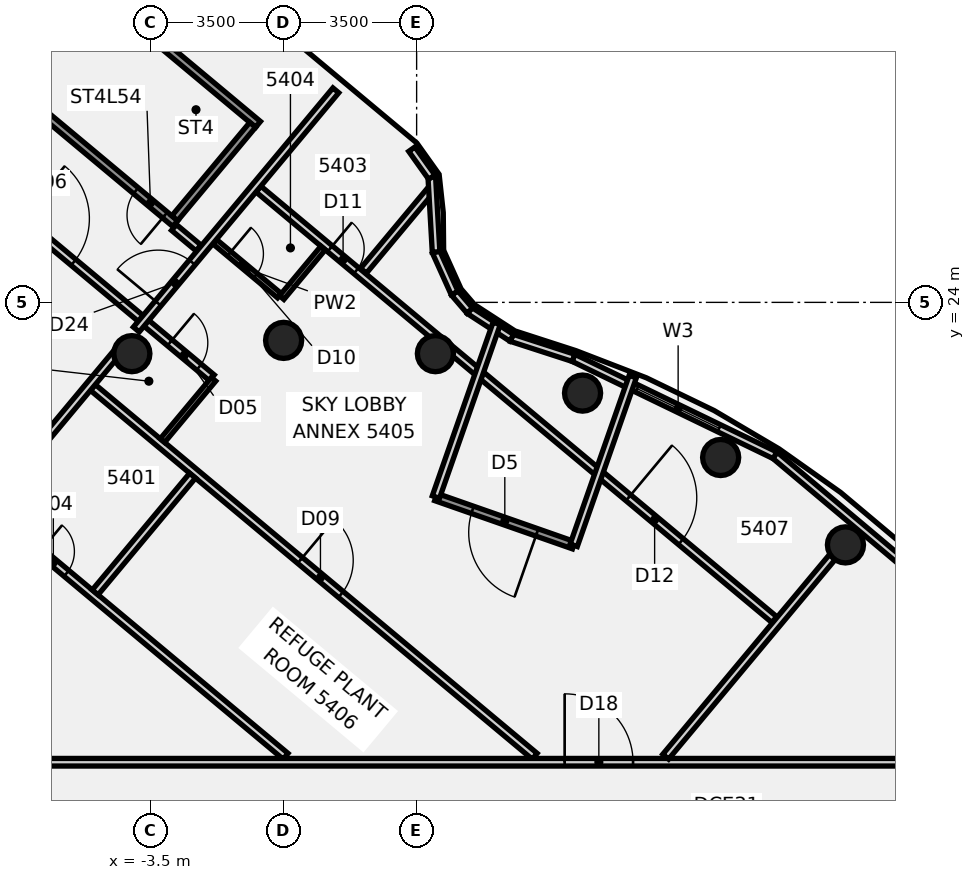
"""IFC4 building model, lengths in metres.
Left out: names, types, materials, properties, quantities, classifications, styles, units other than length and angle.
Written with IfcOpenShell. Run it as: python <this file> out.ifc"""

import sys

from ifc_helpers import new_model, si_unit, direction, frame, frame_2d, origin, origin_2d, place, context, subcontext, project, spatial, polyline, rectangle, circle, outline, extrude, element, fill, save


model = new_model("IFC4")
c1 = context("Model", 3, precision=1e-05, world=origin(), true_north=direction((0.0, 1.0)))
c2 = subcontext(c1, "Body", "Model", "MODEL_VIEW")
j1 = project(units=[si_unit("LENGTHUNIT", "METRE"), si_unit("PLANEANGLEUNIT", "RADIAN")], contexts=[c1])
p1 = place(None, origin())
s1 = spatial("IfcSite", under=j1, at=p1, CompositionType="ELEMENT")
p2 = place(p1, origin())
s2 = spatial("IfcBuilding", under=s1, at=p2, CompositionType="ELEMENT")
p3 = place(p2, frame((0.0, 0.0, 214.9)))
s3 = spatial("IfcBuildingStorey", under=s2, at=p3, CompositionType="ELEMENT", Elevation=214.9)
for number, where, z_axis, x_axis in (
    (1, (14.784, 17.619, -0.18), (0.0, 0.0, 1.0), (1.0, 0.0, 0.0)),
    (2, (11.5, 19.919, -0.18), (0.0, 0.0, 1.0), (1.0, 0.0, 0.0)),
    (3, (7.866, 21.613, -0.18), (0.0, 0.0, 1.0), (1.0, 0.0, 0.0)),
    (4, (3.994, 22.651, -0.18), (0.0, 0.0, 1.0), (1.0, 0.0, 0.0)),
    (5, (0.0, 23.0, -0.18), (0.0, 0.0, 1.0), (1.0, 0.0, 0.0)),
    (6, (-3.994, 22.651, -0.18), (0.0, 0.0, 1.0), (1.0, 0.0, 0.0)),
):
    element("IfcColumn", number, at=place(p3, frame(where, z_axis=z_axis, x_axis=x_axis)), inside=s3, PredefinedType="COLUMN", context=c2, shape_type="SweptSolid", body=[
        extrude(circle(Radius=0.475, at=origin_2d()), origin(), (0.0, 0.0, 1.0), 5.04),
    ])
p4 = place(p3, frame((-12.256, 22.329, 0.0), z_axis=(0.0, 0.0, 1.0), x_axis=(0.767726730688, -0.640777392693, 0.0)))
e7 = element("IfcWall", 7, at=p4, inside=s3, PredefinedType="PARTITIONING", context=c2, shape_type="SweptSolid", body=[
    extrude(rectangle(XDim=16.031, YDim=0.2, at=frame_2d((8.016, 0.0))), origin(), (0.0, 0.0, 1.0), 4.16),
])
p5 = place(p4, frame((7.62, 0.0, 0.0)))
e8 = element("IfcOpeningElement", 8, at=p5, cuts=e7, PredefinedType="OPENING", context=c2, shape_type="SweptSolid", body=[
    extrude(rectangle(XDim=0.9, YDim=2.1, at=frame_2d((0.45, 1.05))), frame((0.0, 0.11, 0.0), z_axis=(0.0, -1.0, 0.0), x_axis=(1.0, 0.0, 0.0)), (0.0, 0.0, 1.0), 0.22),
])
p6 = place(p3, frame((-10.519, 29.217, 0.0), z_axis=(0.0, 0.0, 1.0), x_axis=(0.767759961509, -0.640737576161, 0.0)))
e9 = element("IfcWall", 9, at=p6, inside=s3, PredefinedType="PARTITIONING", context=c2, shape_type="SweptSolid", body=[
    extrude(rectangle(XDim=11.24, YDim=0.2, at=frame_2d((5.62, 0.0))), origin(), (0.0, 0.0, 1.0), 4.16),
])
p7 = place(p6, frame((9.8, 0.0, 0.0)))
e10 = element("IfcOpeningElement", 10, at=p7, cuts=e9, PredefinedType="OPENING", context=c2, shape_type="SweptSolid", body=[
    extrude(rectangle(XDim=1.0, YDim=2.1, at=frame_2d((0.5, 1.05))), frame((0.0, 0.11, 0.0), z_axis=(0.0, -1.0, 0.0), x_axis=(1.0, 0.0, 0.0)), (0.0, 0.0, 1.0), 0.22),
])
p8 = place(p6, frame((4.7, 0.0, 0.0)))
e11 = element("IfcOpeningElement", 11, at=p8, cuts=e9, PredefinedType="OPENING", context=c2, shape_type="SweptSolid", body=[
    extrude(rectangle(XDim=1.8, YDim=2.1, at=frame_2d((0.9, 1.05))), frame((0.0, 0.11, 0.0), z_axis=(0.0, -1.0, 0.0), x_axis=(1.0, 0.0, 0.0)), (0.0, 0.0, 1.0), 0.22),
])
p9 = place(p3, frame((-2.885, 25.971, 0.0), z_axis=(0.0, 0.0, 1.0), x_axis=(0.767840279937, -0.640641322822, 0.0)))
e12 = element("IfcWall", 12, at=p9, inside=s3, PredefinedType="PARTITIONING", context=c2, shape_type="SweptSolid", body=[
    extrude(rectangle(XDim=0.841, YDim=0.2, at=frame_2d((0.42, 0.0))), origin(), (0.0, 0.0, 1.0), 4.16),
])
p10 = place(p3, frame((-5.019, 21.761, 0.0), z_axis=(0.0, 0.0, 1.0), x_axis=(0.767714934774, -0.640791525323, 0.0)))
e13 = element("IfcWall", 13, at=p10, inside=s3, PredefinedType="PARTITIONING", context=c2, shape_type="SweptSolid", body=[
    extrude(rectangle(XDim=15.144, YDim=0.2, at=frame_2d((7.572, 0.0))), origin(), (0.0, 0.0, 1.0), 4.16),
])
p11 = place(p10, frame((7.1, 0.0, 0.0)))
e14 = element("IfcOpeningElement", 14, at=p11, cuts=e13, PredefinedType="OPENING", context=c2, shape_type="SweptSolid", body=[
    extrude(rectangle(XDim=1.4, YDim=2.1, at=frame_2d((0.7, 1.05))), frame((0.0, 0.11, 0.0), z_axis=(0.0, -1.0, 0.0), x_axis=(1.0, 0.0, 0.0)), (0.0, 0.0, 1.0), 0.22),
])
p12 = place(p3, frame((-1.815, 25.599, 0.0), z_axis=(0.0, 0.0, 1.0), x_axis=(0.767616896799, -0.640908963698, 0.0)))
e15 = element("IfcWall", 15, at=p12, inside=s3, PredefinedType="PARTITIONING", context=c2, shape_type="SweptSolid", body=[
    extrude(rectangle(XDim=2.22, YDim=0.15, at=frame_2d((1.11, 0.0))), origin(), (0.0, 0.0, 1.0), 4.16),
])
p13 = place(p12, frame((0.5, 0.0, 0.0)))
e16 = element("IfcOpeningElement", 16, at=p13, cuts=e15, PredefinedType="OPENING", context=c2, shape_type="SweptSolid", body=[
    extrude(rectangle(XDim=0.9, YDim=2.1, at=frame_2d((0.45, 1.05))), frame((0.0, 0.085, 0.0), z_axis=(0.0, -1.0, 0.0), x_axis=(1.0, 0.0, 0.0)), (0.0, 0.0, 1.0), 0.17),
])
p14 = place(p3, frame((-0.662, 26.981, 0.0), z_axis=(0.0, 0.0, 1.0), x_axis=(0.767770033975, -0.640725506695, 0.0)))
e17 = element("IfcWall", 17, at=p14, inside=s3, PredefinedType="PARTITIONING", context=c2, shape_type="SweptSolid", body=[
    extrude(rectangle(XDim=6.123, YDim=0.2, at=frame_2d((3.061, 0.0))), origin(), (0.0, 0.0, 1.0), 4.16),
])
p15 = place(p14, frame((2.45, 0.0, 0.0)))
e18 = element("IfcOpeningElement", 18, at=p15, cuts=e17, PredefinedType="OPENING", context=c2, shape_type="SweptSolid", body=[
    extrude(rectangle(XDim=0.9, YDim=2.1, at=frame_2d((0.45, 1.05))), frame((0.0, 0.11, 0.0), z_axis=(0.0, -1.0, 0.0), x_axis=(1.0, 0.0, 0.0)), (0.0, 0.0, 1.0), 0.22),
])
p16 = place(p3, frame((4.384, 22.77, 0.0), z_axis=(0.0, 0.0, 1.0), x_axis=(0.767777908079, -0.640716071178, 0.0)))
e19 = element("IfcWall", 19, at=p16, inside=s3, PredefinedType="PARTITIONING", context=c2, shape_type="SweptSolid", body=[
    extrude(rectangle(XDim=11.108, YDim=0.2, at=frame_2d((5.554, 0.0))), origin(), (0.0, 0.0, 1.0), 4.16),
])
p17 = place(p16, frame((6.106, 0.0, 0.0)))
e20 = element("IfcOpeningElement", 20, at=p17, cuts=e19, PredefinedType="OPENING", context=c2, shape_type="SweptSolid", body=[
    extrude(rectangle(XDim=1.8, YDim=2.1, at=frame_2d((0.9, 1.05))), frame((0.0, 0.11, 0.0), z_axis=(0.0, -1.0, 0.0), x_axis=(1.0, 0.0, 0.0)), (0.0, 0.0, 1.0), 0.22),
])
p18 = place(p3, frame((-17.045, 11.9, 0.0), z_axis=(0.0, 0.0, 1.0), x_axis=(1.0, 0.0, 0.0)))
e21 = element("IfcWall", 21, at=p18, inside=s3, PredefinedType="PARTITIONING", context=c2, shape_type="SweptSolid", body=[
    extrude(rectangle(XDim=34.145, YDim=0.2, at=frame_2d((17.073, 0.0))), origin(), (0.0, 0.0, 1.0), 4.16),
])
p19 = place(p18, frame((24.44, 0.0, 0.0)))
e22 = element("IfcOpeningElement", 22, at=p19, cuts=e21, PredefinedType="OPENING", context=c2, shape_type="SweptSolid", body=[
    extrude(rectangle(XDim=1.8, YDim=2.1, at=frame_2d((0.9, 1.05))), frame((0.0, 0.11, 0.0), z_axis=(0.0, -1.0, 0.0), x_axis=(1.0, 0.0, 0.0)), (0.0, 0.0, 1.0), 0.22),
])
p20 = place(p18, frame((9.086, 0.0, 0.0)))
e23 = element("IfcOpeningElement", 23, at=p20, cuts=e21, PredefinedType="OPENING", context=c2, shape_type="SweptSolid", body=[
    extrude(rectangle(XDim=1.8, YDim=2.1, at=frame_2d((0.9, 1.05))), frame((0.0, 0.11, 0.0), z_axis=(0.0, -1.0, 0.0), x_axis=(1.0, 0.0, 0.0)), (0.0, 0.0, 1.0), 0.22),
])
p21 = place(p3, frame((-14.145, 25.028, 0.0), z_axis=(0.0, 0.0, 1.0), x_axis=(0.640714977606, 0.767778820671, 0.0)))
e24 = element("IfcWall", 24, at=p21, inside=s3, PredefinedType="PARTITIONING", context=c2, shape_type="SweptSolid", body=[
    extrude(rectangle(XDim=13.438, YDim=0.2, at=frame_2d((6.719, 0.0))), origin(), (0.0, 0.0, 1.0), 4.16),
])
p22 = place(p21, frame((5.84, 0.0, 0.0)))
e25 = element("IfcOpeningElement", 25, at=p22, cuts=e24, PredefinedType="OPENING", context=c2, shape_type="SweptSolid", body=[
    extrude(rectangle(XDim=1.8, YDim=2.1, at=frame_2d((0.9, 1.05))), frame((0.0, 0.11, 0.0), z_axis=(0.0, -1.0, 0.0), x_axis=(1.0, 0.0, 0.0)), (0.0, 0.0, 1.0), 0.22),
])
p23 = place(p3, frame((-7.723, 18.677, 0.0), z_axis=(0.0, 0.0, 1.0), x_axis=(0.640682845605, 0.767805633834, 0.0)))
e26 = element("IfcWall", 26, at=p23, inside=s3, PredefinedType="PARTITIONING", context=c2, shape_type="SweptSolid", body=[
    extrude(rectangle(XDim=5.491, YDim=0.2, at=frame_2d((2.745, 0.0))), origin(), (0.0, 0.0, 1.0), 4.16),
])
p24 = place(p3, frame((-3.877, 23.286, 0.0), z_axis=(0.0, 0.0, 1.0), x_axis=(0.640673591949, 0.767813355302, 0.0)))
e27 = element("IfcWall", 27, at=p24, inside=s3, PredefinedType="PARTITIONING", context=c2, shape_type="SweptSolid", body=[
    extrude(rectangle(XDim=8.196, YDim=0.2, at=frame_2d((4.098, 0.0))), origin(), (0.0, 0.0, 1.0), 4.16),
])
p25 = place(p24, frame((0.897, 0.0, 0.0)))
e28 = element("IfcOpeningElement", 28, at=p25, cuts=e27, PredefinedType="OPENING", context=c2, shape_type="SweptSolid", body=[
    extrude(rectangle(XDim=1.4, YDim=2.1, at=frame_2d((0.7, 1.05))), frame((0.0, 0.11, 0.0), z_axis=(0.0, -1.0, 0.0), x_axis=(1.0, 0.0, 0.0)), (0.0, 0.0, 1.0), 0.22),
])
p26 = place(p3, frame((-4.959, 16.37, 0.0), z_axis=(0.0, 0.0, 1.0), x_axis=(0.64071252412, 0.76778086811, 0.0)))
e29 = element("IfcWall", 29, at=p26, inside=s3, PredefinedType="PARTITIONING", context=c2, shape_type="SweptSolid", body=[
    extrude(rectangle(XDim=4.0, YDim=0.2, at=frame_2d((2.0, 0.0))), origin(), (0.0, 0.0, 1.0), 4.16),
])
p27 = place(p3, frame((2.101, 24.831, 0.0), z_axis=(0.0, 0.0, 1.0), x_axis=(0.640706543974, 0.767785858497, 0.0)))
e30 = element("IfcWall", 30, at=p27, inside=s3, PredefinedType="PARTITIONING", context=c2, shape_type="SweptSolid", body=[
    extrude(rectangle(XDim=2.713, YDim=0.2, at=frame_2d((1.356, 0.0))), origin(), (0.0, 0.0, 1.0), 4.16),
])
p28 = place(p3, frame((-3.189, 20.364, 0.0), z_axis=(0.0, 0.0, 1.0), x_axis=(0.640573180371, 0.767897128911, 0.0)))
e31 = element("IfcWall", 31, at=p28, inside=s3, PredefinedType="PARTITIONING", context=c2, shape_type="SweptSolid", body=[
    extrude(rectangle(XDim=2.1, YDim=0.15, at=frame_2d((1.05, 0.0))), origin(), (0.0, 0.0, 1.0), 4.16),
])
p29 = place(p3, frame((-0.051, 24.125, 0.0), z_axis=(0.0, 0.0, 1.0), x_axis=(0.640565579042, 0.76790346981, 0.0)))
e32 = element("IfcWall", 32, at=p29, inside=s3, PredefinedType="PARTITIONING", context=c2, shape_type="SweptSolid", body=[
    extrude(rectangle(XDim=1.701, YDim=0.15, at=frame_2d((0.85, 0.0))), origin(), (0.0, 0.0, 1.0), 4.16),
])
p30 = place(p3, frame((10.054, 12.046, 0.0), z_axis=(0.0, 0.0, 1.0), x_axis=(0.640840216636, 0.767674290792, 0.0)))
e33 = element("IfcWall", 33, at=p30, inside=s3, PredefinedType="PARTITIONING", context=c2, shape_type="SweptSolid", body=[
    extrude(rectangle(XDim=6.845, YDim=0.2, at=frame_2d((3.422, 0.0))), origin(), (0.0, 0.0, 1.0), 4.16),
])
p31 = place(p3, frame((17.438, 16.192, 0.0), z_axis=(0.0, 0.0, 1.0), x_axis=(-0.765856810589, 0.643011155171, 0.0)))
e34 = element("IfcWall", 34, at=p31, inside=s3, PredefinedType="SOLIDWALL", context=c2, shape_type="SweptSolid", body=[
    extrude(rectangle(XDim=5.887, YDim=0.2, at=frame_2d((2.943, 0.0))), origin(), (0.0, 0.0, 1.0), 4.86),
])
p32 = place(p3, frame((12.929, 19.977, 0.0), z_axis=(0.0, 0.0, 1.0), x_axis=(-0.900284518019, 0.435301948785, 0.0)))
e35 = element("IfcWall", 35, at=p32, inside=s3, PredefinedType="SOLIDWALL", context=c2, shape_type="SweptSolid", body=[
    extrude(rectangle(XDim=5.889, YDim=0.2, at=frame_2d((2.945, 0.0))), origin(), (0.0, 0.0, 1.0), 4.86),
])
p33 = place(p32, frame((1.63, 0.0, 1.4)))
e36 = element("IfcOpeningElement", 36, at=p33, cuts=e35, PredefinedType="OPENING", context=c2, shape_type="SweptSolid", body=[
    extrude(rectangle(XDim=2.4, YDim=2.1, at=frame_2d((1.2, 1.05))), frame((0.0, 0.11, 0.0), z_axis=(0.0, -1.0, 0.0), x_axis=(1.0, 0.0, 0.0)), (0.0, 0.0, 1.0), 0.22),
])
p34 = place(p3, frame((7.627, 22.541, 0.0), z_axis=(0.0, 0.0, 1.0), x_axis=(-0.95133493258, 0.308158800056, 0.0)))
e37 = element("IfcWall", 37, at=p34, inside=s3, PredefinedType="SOLIDWALL", context=c2, shape_type="SweptSolid", body=[
    extrude(rectangle(XDim=1.709, YDim=0.2, at=frame_2d((0.854, 0.0))), origin(), (0.0, 0.0, 1.0), 4.86),
])
p35 = place(p3, frame((6.001, 23.067, 0.0), z_axis=(0.0, 0.0, 1.0), x_axis=(-0.839116919662, 0.543951096274, 0.0)))
e38 = element("IfcWall", 38, at=p35, inside=s3, PredefinedType="SOLIDWALL", context=c2, shape_type="SweptSolid", body=[
    extrude(rectangle(XDim=1.316, YDim=0.2, at=frame_2d((0.658, 0.0))), origin(), (0.0, 0.0, 1.0), 4.86),
])
p36 = place(p3, frame((4.897, 23.783, 0.0), z_axis=(0.0, 0.0, 1.0), x_axis=(-0.651417628254, 0.758719364192, 0.0)))
e39 = element("IfcWall", 39, at=p36, inside=s3, PredefinedType="SOLIDWALL", context=c2, shape_type="SweptSolid", body=[
    extrude(rectangle(XDim=0.61, YDim=0.2, at=frame_2d((0.305, 0.0))), origin(), (0.0, 0.0, 1.0), 4.86),
])
p37 = place(p3, frame((4.5, 24.246, 0.0), z_axis=(0.0, 0.0, 1.0), x_axis=(-0.411322207494, 0.911490011806, 0.0)))
e40 = element("IfcWall", 40, at=p37, inside=s3, PredefinedType="SOLIDWALL", context=c2, shape_type="SweptSolid", body=[
    extrude(rectangle(XDim=1.187, YDim=0.2, at=frame_2d((0.594, 0.0))), origin(), (0.0, 0.0, 1.0), 4.86),
])
p38 = place(p3, frame((4.011, 25.328, 0.0), z_axis=(0.0, 0.0, 1.0), x_axis=(-0.057109766027, 0.998367905446, 0.0)))
e41 = element("IfcWall", 41, at=p38, inside=s3, PredefinedType="SOLIDWALL", context=c2, shape_type="SweptSolid", body=[
    extrude(rectangle(XDim=1.971, YDim=0.2, at=frame_2d((0.985, 0.0))), origin(), (0.0, 0.0, 1.0), 4.86),
])
p39 = place(p3, frame((3.899, 27.295, 0.0), z_axis=(0.0, 0.0, 1.0), x_axis=(-0.580599391883, 0.814189379779, 0.0)))
e42 = element("IfcWall", 42, at=p39, inside=s3, PredefinedType="SOLIDWALL", context=c2, shape_type="SweptSolid", body=[
    extrude(rectangle(XDim=0.904, YDim=0.2, at=frame_2d((0.452, 0.0))), origin(), (0.0, 0.0, 1.0), 4.86),
])
p40 = place(p3, frame((7.634, 17.608, 0.0), z_axis=(0.0, 0.0, 1.0), x_axis=(-0.943849439762, 0.330375899638, 0.0)))
e43 = element("IfcWall", 43, at=p40, inside=s3, PredefinedType="SOLIDWALL", context=c2, shape_type="SweptSolid", body=[
    extrude(rectangle(XDim=3.842, YDim=0.2, at=frame_2d((1.921, 0.0))), origin(), (0.0, 0.0, 1.0), 4.364),
])
p41 = place(p40, frame((1.021, 0.0, 0.0)))
e44 = element("IfcOpeningElement", 44, at=p41, cuts=e43, PredefinedType="OPENING", context=c2, shape_type="SweptSolid", body=[
    extrude(rectangle(XDim=1.8, YDim=2.4, at=frame_2d((0.9, 1.2))), frame((0.0, 0.11, 0.0), z_axis=(0.0, -1.0, 0.0), x_axis=(1.0, 0.0, 0.0)), (0.0, 0.0, 1.0), 0.22),
])
p42 = place(p3, frame((7.634, 17.608, 0.0), z_axis=(0.0, 0.0, 1.0), x_axis=(0.330366613527, 0.943852690131, 0.0)))
e45 = element("IfcWall", 45, at=p42, inside=s3, PredefinedType="SOLIDWALL", context=c2, shape_type="SweptSolid", body=[
    extrude(rectangle(XDim=4.702, YDim=0.2, at=frame_2d((2.351, 0.0))), origin(), (0.0, 0.0, 1.0), 4.86),
])
p43 = place(p3, frame((4.007, 18.878, 0.0), z_axis=(0.0, 0.0, 1.0), x_axis=(0.330357165554, 0.94385599705, 0.0)))
e46 = element("IfcWall", 46, at=p43, inside=s3, PredefinedType="SOLIDWALL", context=c2, shape_type="SweptSolid", body=[
    extrude(rectangle(XDim=4.84, YDim=0.2, at=frame_2d((2.42, 0.0))), origin(), (0.0, 0.0, 1.0), 4.364),
])
p44 = place(p3, frame((-2.852, 26.074, -0.18), z_axis=(0.0, 0.0, 1.0), x_axis=(-0.767728232678, 0.640775593129, 0.0)))
e47 = element("IfcWall", 47, at=p44, inside=s3, PredefinedType="SHEAR", context=c2, shape_type="SweptSolid", body=[
    extrude(rectangle(XDim=6.7, YDim=0.2, at=frame_2d((3.35, 0.0))), origin(), (0.0, 0.0, 1.0), 4.444),
])
p45 = place(p44, frame((0.35, 0.0, 0.0)))
e48 = element("IfcOpeningElement", 48, at=p45, cuts=e47, PredefinedType="OPENING", context=c2, shape_type="SweptSolid", body=[
    extrude(rectangle(XDim=1.0, YDim=2.1, at=frame_2d((0.5, 1.05))), frame((0.0, 0.11, 0.0), z_axis=(0.0, -1.0, 0.0), x_axis=(1.0, 0.0, 0.0)), (0.0, 0.0, 1.0), 0.22),
])
p46 = place(p3, frame((-0.674, 28.684, -0.18), z_axis=(0.0, 0.0, 1.0), x_axis=(-0.767713270537, 0.640793519195, 0.0)))
e49 = element("IfcWall", 49, at=p46, inside=s3, PredefinedType="SHEAR", context=c2, shape_type="SweptSolid", body=[
    extrude(rectangle(XDim=6.7, YDim=0.2, at=frame_2d((3.35, 0.0))), origin(), (0.0, 0.0, 1.0), 4.444),
])
p47 = place(p3, frame((-0.814, 28.671, -0.18), z_axis=(0.0, 0.0, 1.0), x_axis=(-0.640777035898, -0.767727028485, 0.0)))
e50 = element("IfcWall", 50, at=p47, inside=s3, PredefinedType="SHEAR", context=c2, shape_type="SweptSolid", body=[
    extrude(rectangle(XDim=3.2, YDim=0.2, at=frame_2d((1.6, 0.0))), origin(), (0.0, 0.0, 1.0), 5.04),
])
p48 = place(p3, frame((0.0, 0.0, -0.18)))
e51 = element("IfcWall", 51, at=p48, inside=s3, PredefinedType="SHEAR", context=c2, shape_type="SweptSolid", body=[
    extrude(outline(polyline([(-5.728, 32.772), (-5.881, 32.9), (-7.932, 30.444), (-7.778, 30.316), (-5.728, 32.772)])), origin(), (0.0, 0.0, 1.0), 4.444),
])
p49 = place(p5, origin())
e52 = element("IfcDoor", 52, at=p49, inside=s3, OperationType="SINGLE_SWING_LEFT", PredefinedType="DOOR", context=c2, shape_type="SweptSolid", body=[
    extrude(rectangle(XDim=0.9, YDim=2.1, at=frame_2d((0.45, 1.05))), frame((0.0, 0.025, 0.0), z_axis=(0.0, -1.0, 0.0), x_axis=(1.0, 0.0, 0.0)), (0.0, 0.0, 1.0), 0.05),
])
fill(e8, e52)
p50 = place(p7, frame((1.0, 0.0, 0.0), z_axis=(0.0, 0.0, 1.0), x_axis=(-1.0, 0.0, 0.0)))
e53 = element("IfcDoor", 53, at=p50, inside=s3, OperationType="SINGLE_SWING_RIGHT", PredefinedType="DOOR", context=c2, shape_type="SweptSolid", body=[
    extrude(rectangle(XDim=1.0, YDim=2.1, at=frame_2d((0.5, 1.05))), frame((0.0, 0.025, 0.0), z_axis=(0.0, -1.0, 0.0), x_axis=(1.0, 0.0, 0.0)), (0.0, 0.0, 1.0), 0.05),
])
fill(e10, e53)
p51 = place(p8, frame((1.8, 0.0, 0.0), z_axis=(0.0, 0.0, 1.0), x_axis=(-1.0, 0.0, 0.0)))
e54 = element("IfcDoor", 54, at=p51, inside=s3, OperationType="DOUBLE_DOOR_SINGLE_SWING", PredefinedType="DOOR", context=c2, shape_type="SweptSolid", body=[
    extrude(rectangle(XDim=1.8, YDim=2.1, at=frame_2d((0.9, 1.05))), frame((0.0, 0.025, 0.0), z_axis=(0.0, -1.0, 0.0), x_axis=(1.0, 0.0, 0.0)), (0.0, 0.0, 1.0), 0.05),
])
fill(e11, e54)
p52 = place(p11, frame((1.4, 0.0, 0.0), z_axis=(0.0, 0.0, 1.0), x_axis=(-1.0, 0.0, 0.0)))
e55 = element("IfcDoor", 55, at=p52, inside=s3, OperationType="DOUBLE_DOOR_SINGLE_SWING", PredefinedType="DOOR", context=c2, shape_type="SweptSolid", body=[
    extrude(rectangle(XDim=1.4, YDim=2.1, at=frame_2d((0.7, 1.05))), frame((0.0, 0.025, 0.0), z_axis=(0.0, -1.0, 0.0), x_axis=(1.0, 0.0, 0.0)), (0.0, 0.0, 1.0), 0.05),
])
fill(e14, e55)
p53 = place(p13, origin())
e56 = element("IfcDoor", 56, at=p53, inside=s3, OperationType="SINGLE_SWING_RIGHT", PredefinedType="DOOR", context=c2, shape_type="SweptSolid", body=[
    extrude(rectangle(XDim=0.9, YDim=2.1, at=frame_2d((0.45, 1.05))), frame((0.0, 0.025, 0.0), z_axis=(0.0, -1.0, 0.0), x_axis=(1.0, 0.0, 0.0)), (0.0, 0.0, 1.0), 0.05),
])
fill(e16, e56)
p54 = place(p15, origin())
e57 = element("IfcDoor", 57, at=p54, inside=s3, OperationType="SINGLE_SWING_RIGHT", PredefinedType="DOOR", context=c2, shape_type="SweptSolid", body=[
    extrude(rectangle(XDim=0.9, YDim=2.1, at=frame_2d((0.45, 1.05))), frame((0.0, 0.025, 0.0), z_axis=(0.0, -1.0, 0.0), x_axis=(1.0, 0.0, 0.0)), (0.0, 0.0, 1.0), 0.05),
])
fill(e18, e57)
p55 = place(p17, origin())
e58 = element("IfcDoor", 58, at=p55, inside=s3, OperationType="DOUBLE_DOOR_SINGLE_SWING", PredefinedType="DOOR", context=c2, shape_type="SweptSolid", body=[
    extrude(rectangle(XDim=1.8, YDim=2.1, at=frame_2d((0.9, 1.05))), frame((0.0, 0.025, 0.0), z_axis=(0.0, -1.0, 0.0), x_axis=(1.0, 0.0, 0.0)), (0.0, 0.0, 1.0), 0.05),
])
fill(e20, e58)
p56 = place(p19, frame((1.8, 0.0, 0.0), z_axis=(0.0, 0.0, 1.0), x_axis=(-1.0, 0.0, 0.0)))
e59 = element("IfcDoor", 59, at=p56, inside=s3, OperationType="DOUBLE_DOOR_SINGLE_SWING", PredefinedType="DOOR", context=c2, shape_type="SweptSolid", body=[
    extrude(rectangle(XDim=1.8, YDim=2.1, at=frame_2d((0.9, 1.05))), frame((0.0, 0.025, 0.0), z_axis=(0.0, -1.0, 0.0), x_axis=(1.0, 0.0, 0.0)), (0.0, 0.0, 1.0), 0.05),
])
fill(e22, e59)
p57 = place(p25, frame((1.4, 0.0, 0.0), z_axis=(0.0, 0.0, 1.0), x_axis=(-1.0, 0.0, 0.0)))
e60 = element("IfcDoor", 60, at=p57, inside=s3, OperationType="DOUBLE_DOOR_SINGLE_SWING", PredefinedType="DOOR", context=c2, shape_type="SweptSolid", body=[
    extrude(rectangle(XDim=1.4, YDim=2.1, at=frame_2d((0.7, 1.05))), frame((0.0, 0.025, 0.0), z_axis=(0.0, -1.0, 0.0), x_axis=(1.0, 0.0, 0.0)), (0.0, 0.0, 1.0), 0.05),
])
fill(e28, e60)
p58 = place(p33, origin())
e61 = element("IfcWindow", 61, at=p58, inside=s3, PartitioningType="SINGLE_PANEL", PredefinedType="WINDOW", context=c2, shape_type="SweptSolid", body=[
    extrude(rectangle(XDim=2.4, YDim=2.1, at=frame_2d((1.2, 1.05))), frame((0.0, 0.03, 0.0), z_axis=(0.0, -1.0, 0.0), x_axis=(1.0, 0.0, 0.0)), (0.0, 0.0, 1.0), 0.06),
])
fill(e36, e61)
p59 = place(p41, origin())
e62 = element("IfcDoor", 62, at=p59, inside=s3, OperationType="SINGLE_SWING_LEFT", PredefinedType="DOOR", context=c2, shape_type="SweptSolid", body=[
    extrude(rectangle(XDim=1.8, YDim=2.4, at=frame_2d((0.9, 1.2))), frame((0.0, 0.025, 0.0), z_axis=(0.0, -1.0, 0.0), x_axis=(1.0, 0.0, 0.0)), (0.0, 0.0, 1.0), 0.05),
])
fill(e44, e62)
p60 = place(p45, origin())
e63 = element("IfcDoor", 63, at=p60, inside=s3, OperationType="SINGLE_SWING_LEFT", PredefinedType="DOOR", context=c2, shape_type="SweptSolid", body=[
    extrude(rectangle(XDim=1.0, YDim=2.1, at=frame_2d((0.5, 1.05))), frame((0.0, 0.025, 0.0), z_axis=(0.0, -1.0, 0.0), x_axis=(1.0, 0.0, 0.0)), (0.0, 0.0, 1.0), 0.05),
])
fill(e48, e63)
save(model, sys.argv[1])
